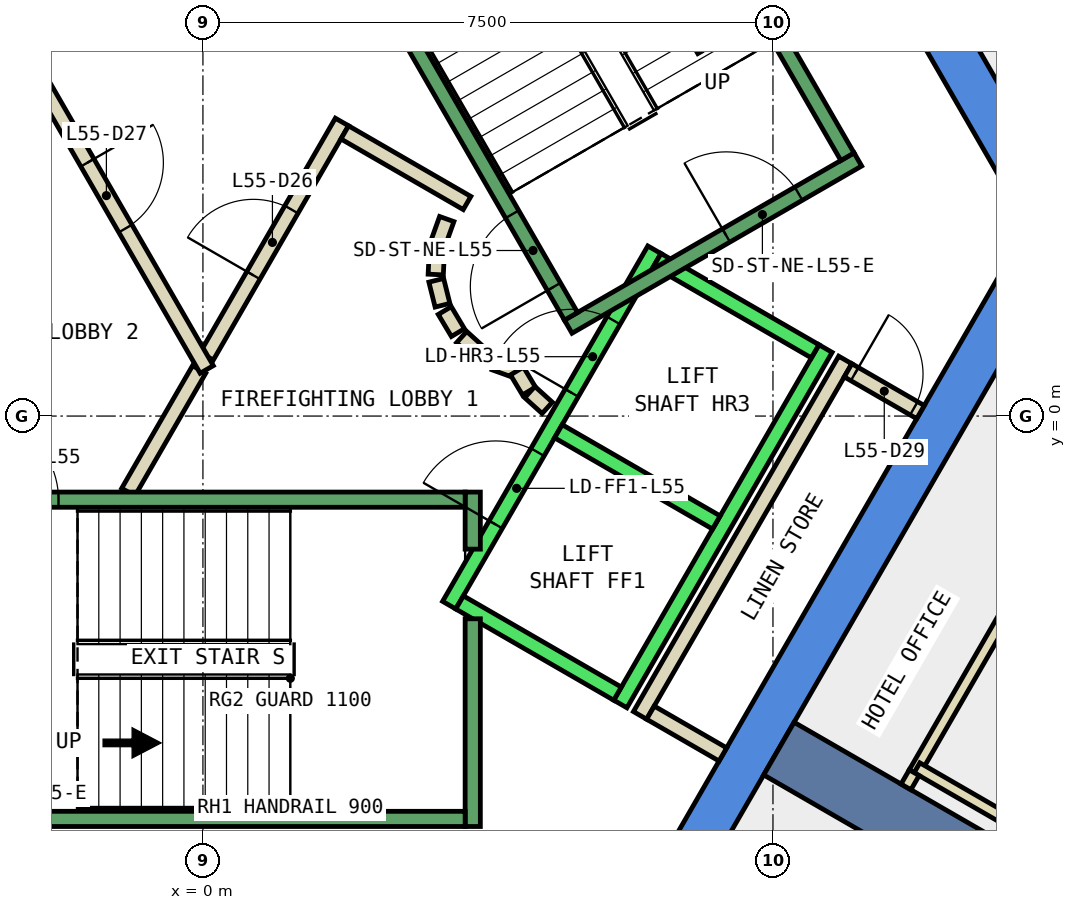
"""IFC4 building model, lengths in metres.
Left out: names, types, materials, properties, quantities, classifications, styles, units other than length and angle.
Written with IfcOpenShell. Run it as: python <this file> out.ifc"""

import sys

from ifc_helpers import new_model, si_unit, direction, frame, frame_2d, origin, place, context, subcontext, project, spatial, polyline, rectangle, outline, extrude, element, fill, save


model = new_model("IFC4")
c1 = context("Model", 3, precision=1e-05, world=origin(), true_north=direction((0.0, 1.0)))
c2 = subcontext(c1, "Body", "Model", "MODEL_VIEW")
j1 = project(units=[si_unit("LENGTHUNIT", "METRE"), si_unit("PLANEANGLEUNIT", "RADIAN")], contexts=[c1])
p1 = place(None, origin())
s1 = spatial("IfcSite", under=j1, at=p1, CompositionType="ELEMENT")
p2 = place(p1, origin())
s2 = spatial("IfcBuilding", under=s1, at=p2, CompositionType="ELEMENT")
p3 = place(p2, frame((0.0, 0.0, 245.0)))
s3 = spatial("IfcBuildingStorey", under=s2, at=p3, CompositionType="ELEMENT", Elevation=245.0)
p4 = place(p3, frame((0.0, 0.0, -0.34)))
e1 = element("IfcWall", 1, at=p4, inside=s3, PredefinedType="SHEAR", context=c2, shape_type="SweptSolid", body=[
    extrude(outline(polyline([(6.786, 10.747), (6.266, 10.447), (10.854, 2.5), (11.547, 2.5), (6.786, 10.747)])), origin(), (0.0, 0.0, 1.0), 3.6),
])
p5 = place(p3, frame((0.0, 0.0, -0.34)))
e2 = element("IfcWall", 2, at=p5, inside=s3, PredefinedType="SHEAR", context=c2, shape_type="SweptSolid", body=[
    extrude(outline(polyline([(5.774, -7.5), (11.547, 2.5), (10.854, 2.5), (5.427, -6.9), (5.774, -7.5)])), origin(), (0.0, 0.0, 1.0), 3.6),
])
p6 = place(p3, frame((7.578, -4.375, -0.34), z_axis=(0.0, 0.0, 1.0), x_axis=(0.866024315419, -0.5000018851, 0.0)))
e3 = element("IfcWall", 3, at=p6, inside=s3, PredefinedType="SHEAR", context=c2, shape_type="SweptSolid", body=[
    extrude(rectangle(XDim=9.0, YDim=0.8, at=frame_2d((4.5, 0.0))), origin(), (0.0, 0.0, 1.0), 3.6),
])
p7 = place(p3, frame((5.751, -3.938, 0.0), z_axis=(0.0, 0.0, 1.0), x_axis=(0.500034260056, 0.866005622828, 0.0)))
e4 = element("IfcWall", 4, at=p7, inside=s3, PredefinedType="PARTITIONING", context=c2, shape_type="SweptSolid", body=[
    extrude(rectangle(XDim=5.399, YDim=0.2, at=frame_2d((2.7, 0.0))), origin(), (0.0, 0.0, 1.0), 3.26),
])
p8 = place(p3, frame((8.488, 0.602, 0.0), z_axis=(0.0, 0.0, 1.0), x_axis=(0.866063652425, -0.499933745558, 0.0)))
e5 = element("IfcWall", 5, at=p8, inside=s3, PredefinedType="PARTITIONING", context=c2, shape_type="SweptSolid", body=[
    extrude(rectangle(XDim=1.1, YDim=0.2, at=frame_2d((0.55, 0.0))), origin(), (0.0, 0.0, 1.0), 3.26),
])
p9 = place(p8, frame((0.1, 0.0, 0.0)))
e6 = element("IfcOpeningElement", 6, at=p9, cuts=e5, PredefinedType="OPENING", context=c2, shape_type="SweptSolid", body=[
    extrude(rectangle(XDim=0.9, YDim=2.1, at=frame_2d((0.45, 1.05))), frame((0.0, 0.11, 0.0), z_axis=(0.0, -1.0, 0.0), x_axis=(1.0, 0.0, 0.0)), (0.0, 0.0, 1.0), 0.22),
])
p10 = place(p3, frame((6.841, -4.452, 0.0), z_axis=(0.0, 0.0, 1.0), x_axis=(-0.86621513555, 0.499671230855, 0.0)))
e7 = element("IfcWall", 7, at=p10, inside=s3, PredefinedType="PARTITIONING", context=c2, shape_type="SweptSolid", body=[
    extrude(rectangle(XDim=1.1, YDim=0.2, at=frame_2d((0.55, 0.0))), origin(), (0.0, 0.0, 1.0), 3.26),
])
p11 = place(p3, frame((9.358, -4.692, 0.0), z_axis=(0.0, 0.0, 1.0), x_axis=(0.500027777314, 0.866009365951, 0.0)))
e8 = element("IfcWall", 8, at=p11, inside=s3, PredefinedType="PARTITIONING", context=c2, shape_type="SweptSolid", body=[
    extrude(rectangle(XDim=7.36, YDim=0.15, at=frame_2d((3.68, 0.0))), origin(), (0.0, 0.0, 1.0), 3.26),
])
p12 = place(p3, frame((-0.982, -1.0, 0.0), z_axis=(0.0, 0.0, 1.0), x_axis=(0.50024047865, 0.865886518847, 0.0)))
e9 = element("IfcWall", 9, at=p12, inside=s3, PredefinedType="PARTITIONING", context=c2, shape_type="SweptSolid", body=[
    extrude(rectangle(XDim=1.863, YDim=0.2, at=frame_2d((0.931, 0.0))), origin(), (0.0, 0.0, 1.0), 3.26),
])
p13 = place(p3, frame((0.05, 0.787, 0.0), z_axis=(0.0, 0.0, 1.0), x_axis=(0.499954076797, 0.866051915934, 0.0)))
e10 = element("IfcWall", 10, at=p13, inside=s3, PredefinedType="PARTITIONING", context=c2, shape_type="SweptSolid", body=[
    extrude(rectangle(XDim=3.558, YDim=0.2, at=frame_2d((1.779, 0.0))), origin(), (0.0, 0.0, 1.0), 3.26),
])
p14 = place(p13, frame((1.229, 0.0, 0.0)))
e11 = element("IfcOpeningElement", 11, at=p14, cuts=e10, PredefinedType="OPENING", context=c2, shape_type="SweptSolid", body=[
    extrude(rectangle(XDim=1.0, YDim=2.1, at=frame_2d((0.5, 1.05))), frame((0.0, 0.11, 0.0), z_axis=(0.0, -1.0, 0.0), x_axis=(1.0, 0.0, 0.0)), (0.0, 0.0, 1.0), 0.22),
])
p15 = place(p3, frame((1.866, 3.732, 0.0), z_axis=(0.0, 0.0, 1.0), x_axis=(0.866043361281, -0.499968895414, 0.0)))
e12 = element("IfcWall", 12, at=p15, inside=s3, PredefinedType="PARTITIONING", context=c2, shape_type="SweptSolid", body=[
    extrude(rectangle(XDim=1.858, YDim=0.2, at=frame_2d((0.929, 0.0))), origin(), (0.0, 0.0, 1.0), 3.26),
])
p16 = place(p3, frame((3.208, 2.592, 0.0), z_axis=(0.0, 0.0, 1.0), x_axis=(-0.337388820924, -0.941365382578, 0.0)))
e13 = element("IfcWall", 13, at=p16, inside=s3, PredefinedType="PARTITIONING", context=c2, shape_type="SweptSolid", body=[
    extrude(rectangle(XDim=0.338, YDim=0.2, at=frame_2d((0.169, 0.0))), origin(), (0.0, 0.0, 1.0), 3.26),
])
p17 = place(p3, frame((3.079, 2.199, 0.0), z_axis=(0.0, 0.0, 1.0), x_axis=(-0.047771483479, -0.998858290933, 0.0)))
e14 = element("IfcWall", 14, at=p17, inside=s3, PredefinedType="PARTITIONING", context=c2, shape_type="SweptSolid", body=[
    extrude(rectangle(XDim=0.337, YDim=0.2, at=frame_2d((0.169, 0.0))), origin(), (0.0, 0.0, 1.0), 3.26),
])
p18 = place(p3, frame((3.07, 1.786, 0.0), z_axis=(0.0, 0.0, 1.0), x_axis=(0.242705583207, -0.970099994784, 0.0)))
e15 = element("IfcWall", 15, at=p18, inside=s3, PredefinedType="PARTITIONING", context=c2, shape_type="SweptSolid", body=[
    extrude(rectangle(XDim=0.338, YDim=0.2, at=frame_2d((0.169, 0.0))), origin(), (0.0, 0.0, 1.0), 3.26),
])
for number, where, z_axis, x_axis in (
    (16, (3.182, 1.388, 0.0), (0.0, 0.0, 1.0), (0.512, -0.859, 0.0)),
    (17, (3.404, 1.039, 0.0), (0.0, 0.0, 1.0), (0.74, -0.672, 0.0)),
):
    element("IfcWall", number, at=place(p3, frame(where, z_axis=z_axis, x_axis=x_axis)), inside=s3, PredefinedType="PARTITIONING", context=c2, shape_type="SweptSolid", body=[
        extrude(rectangle(XDim=0.338, YDim=0.2, at=frame_2d((0.169, 0.0))), origin(), (0.0, 0.0, 1.0), 3.26),
    ])
p19 = place(p3, frame((3.838, 0.702, 0.0), z_axis=(0.0, 0.0, 1.0), x_axis=(0.941035081519, -0.338308993895, 0.0)))
e18 = element("IfcWall", 18, at=p19, inside=s3, PredefinedType="PARTITIONING", context=c2, shape_type="SweptSolid", body=[
    extrude(rectangle(XDim=0.337, YDim=0.2, at=frame_2d((0.168, 0.0))), origin(), (0.0, 0.0, 1.0), 3.26),
])
p20 = place(p3, frame((4.132, 0.593, 0.0), z_axis=(0.0, 0.0, 1.0), x_axis=(0.513561617048, -0.858052717201, 0.0)))
e19 = element("IfcWall", 19, at=p20, inside=s3, PredefinedType="PARTITIONING", context=c2, shape_type="SweptSolid", body=[
    extrude(rectangle(XDim=0.308, YDim=0.2, at=frame_2d((0.154, 0.0))), origin(), (0.0, 0.0, 1.0), 3.26),
])
p21 = place(p3, frame((4.301, 0.315, 0.0), z_axis=(0.0, 0.0, 1.0), x_axis=(0.741798017506, -0.670623367639, 0.0)))
e20 = element("IfcWall", 20, at=p21, inside=s3, PredefinedType="PARTITIONING", context=c2, shape_type="SweptSolid", body=[
    extrude(rectangle(XDim=0.309, YDim=0.2, at=frame_2d((0.154, 0.0))), origin(), (0.0, 0.0, 1.0), 3.26),
])
p22 = place(p3, frame((-2.54, 5.1, 0.0), z_axis=(0.0, 0.0, 1.0), x_axis=(0.499925051871, -0.866068670783, 0.0)))
e21 = element("IfcWall", 21, at=p22, inside=s3, PredefinedType="PARTITIONING", context=c2, shape_type="SweptSolid", body=[
    extrude(rectangle(XDim=5.181, YDim=0.2, at=frame_2d((2.59, 0.0))), origin(), (0.0, 0.0, 1.0), 3.26),
])
p23 = place(p22, frame((2.04, 0.0, 0.0)))
e22 = element("IfcOpeningElement", 22, at=p23, cuts=e21, PredefinedType="OPENING", context=c2, shape_type="SweptSolid", body=[
    extrude(rectangle(XDim=1.0, YDim=2.1, at=frame_2d((0.5, 1.05))), frame((0.0, 0.11, 0.0), z_axis=(0.0, -1.0, 0.0), x_axis=(1.0, 0.0, 0.0)), (0.0, 0.0, 1.0), 0.22),
])
p24 = place(p3, frame((9.395, -4.627, 0.0), z_axis=(0.0, 0.0, 1.0), x_axis=(0.866034131428, -0.499984882974, 0.0)))
e23 = element("IfcWall", 23, at=p24, inside=s3, PredefinedType="PARTITIONING", context=c2, shape_type="SweptSolid", body=[
    extrude(rectangle(XDim=5.1, YDim=0.15, at=frame_2d((2.55, 0.0))), origin(), (0.0, 0.0, 1.0), 3.26),
])
p25 = place(p3, frame((9.25, -4.879, 0.0), z_axis=(0.0, 0.0, 1.0), x_axis=(0.499787711288, 0.866147934042, 0.0)))
e24 = element("IfcWall", 24, at=p25, inside=s3, PredefinedType="PARTITIONING", context=c2, shape_type="SweptSolid", body=[
    extrude(rectangle(XDim=0.216, YDim=0.15, at=frame_2d((0.108, 0.0))), origin(), (0.0, 0.0, 1.0), 3.26),
])
p26 = place(p3, frame((3.24, -2.488, 0.0), z_axis=(0.0, 0.0, 1.0), x_axis=(0.500034260056, 0.866005622828, 0.0)))
e25 = element("IfcWall", 25, at=p26, inside=s3, PredefinedType="STANDARD", context=c2, shape_type="SweptSolid", body=[
    extrude(rectangle(XDim=5.399, YDim=0.2, at=frame_2d((2.7, 0.0))), origin(), (0.0, 0.0, 1.0), 3.26),
])
p27 = place(p26, frame((3.225, 0.0, 0.0)))
e26 = element("IfcOpeningElement", 26, at=p27, cuts=e25, PredefinedType="OPENING", context=c2, shape_type="SweptSolid", body=[
    extrude(rectangle(XDim=1.1, YDim=2.1, at=frame_2d((0.55, 1.05))), frame((0.0, 0.11, 0.0), z_axis=(0.0, -1.0, 0.0), x_axis=(1.0, 0.0, 0.0)), (0.0, 0.0, 1.0), 0.22),
])
p28 = place(p26, frame((1.225, 0.0, 0.0)))
e27 = element("IfcOpeningElement", 27, at=p28, cuts=e25, PredefinedType="OPENING", context=c2, shape_type="SweptSolid", body=[
    extrude(rectangle(XDim=1.1, YDim=2.1, at=frame_2d((0.55, 1.05))), frame((0.0, 0.11, 0.0), z_axis=(0.0, -1.0, 0.0), x_axis=(1.0, 0.0, 0.0)), (0.0, 0.0, 1.0), 0.22),
])
p29 = place(p3, frame((5.492, -3.788, 0.0), z_axis=(0.0, 0.0, 1.0), x_axis=(0.500034260056, 0.866005622828, 0.0)))
e28 = element("IfcWall", 28, at=p29, inside=s3, PredefinedType="STANDARD", context=c2, shape_type="SweptSolid", body=[
    extrude(rectangle(XDim=5.399, YDim=0.2, at=frame_2d((2.7, 0.0))), origin(), (0.0, 0.0, 1.0), 3.26),
])
p30 = place(p3, frame((3.377, -2.452, 0.0), z_axis=(0.0, 0.0, 1.0), x_axis=(0.865955154139, -0.50012165622, 0.0)))
e29 = element("IfcWall", 29, at=p30, inside=s3, PredefinedType="STANDARD", context=c2, shape_type="SweptSolid", body=[
    extrude(rectangle(XDim=2.4, YDim=0.2, at=frame_2d((1.2, 0.0))), origin(), (0.0, 0.0, 1.0), 3.26),
])
for number, where, z_axis, x_axis in (
    (30, (4.677, -0.2, 0.0), (0.0, 0.0, 1.0), (0.866, -0.5, 0.0)),
    (31, (5.977, 2.052, 0.0), (0.0, 0.0, 1.0), (0.866, -0.5, 0.0)),
):
    element("IfcWall", number, at=place(p3, frame(where, z_axis=z_axis, x_axis=x_axis)), inside=s3, PredefinedType="STANDARD", context=c2, shape_type="SweptSolid", body=[
        extrude(rectangle(XDim=2.399, YDim=0.2, at=frame_2d((1.2, 0.0))), origin(), (0.0, 0.0, 1.0), 3.26),
    ])
p31 = place(p3, frame((3.55, -2.667, 0.0), z_axis=(0.0, 0.0, 1.0), x_axis=(0.0, -1.0, 0.0)))
e32 = element("IfcWall", 32, at=p31, inside=s3, PredefinedType="STANDARD", context=c2, shape_type="SweptSolid", body=[
    extrude(rectangle(XDim=2.733, YDim=0.2, at=frame_2d((1.366, 0.0))), origin(), (0.0, 0.0, 1.0), 3.26),
])
p32 = place(p3, frame((3.55, -1.0, 0.0), z_axis=(0.0, 0.0, 1.0), x_axis=(0.0, -1.0, 0.0)))
e33 = element("IfcWall", 33, at=p32, inside=s3, PredefinedType="STANDARD", context=c2, shape_type="SweptSolid", body=[
    extrude(rectangle(XDim=0.751, YDim=0.2, at=frame_2d((0.375, 0.0))), origin(), (0.0, 0.0, 1.0), 3.26),
])
p33 = place(p3, frame((-3.45, -1.1, 0.0), z_axis=(0.0, 0.0, 1.0), x_axis=(1.0, 0.0, 0.0)))
e34 = element("IfcWall", 34, at=p33, inside=s3, PredefinedType="STANDARD", context=c2, shape_type="SweptSolid", body=[
    extrude(rectangle(XDim=6.9, YDim=0.2, at=frame_2d((3.45, 0.0))), origin(), (0.0, 0.0, 1.0), 3.26),
])
p34 = place(p33, frame((0.45, 0.0, 0.0)))
e35 = element("IfcOpeningElement", 35, at=p34, cuts=e34, PredefinedType="OPENING", context=c2, shape_type="SweptSolid", body=[
    extrude(rectangle(XDim=1.1, YDim=2.2, at=frame_2d((0.55, 1.1))), frame((0.0, 0.11, 0.0), z_axis=(0.0, -1.0, 0.0), x_axis=(1.0, 0.0, 0.0)), (0.0, 0.0, 1.0), 0.22),
])
p35 = place(p3, frame((-3.45, -5.3, 0.0), z_axis=(0.0, 0.0, 1.0), x_axis=(1.0, 0.0, 0.0)))
e36 = element("IfcWall", 36, at=p35, inside=s3, PredefinedType="STANDARD", context=c2, shape_type="SweptSolid", body=[
    extrude(rectangle(XDim=6.9, YDim=0.2, at=frame_2d((3.45, 0.0))), origin(), (0.0, 0.0, 1.0), 3.26),
])
p36 = place(p3, frame((4.806, 1.176, 0.0), z_axis=(0.0, 0.0, 1.0), x_axis=(0.866059941101, 0.499940174841, 0.0)))
e37 = element("IfcWall", 37, at=p36, inside=s3, PredefinedType="STANDARD", context=c2, shape_type="SweptSolid", body=[
    extrude(rectangle(XDim=4.4, YDim=0.2, at=frame_2d((2.2, 0.0))), origin(), (0.0, 0.0, 1.0), 3.26),
])
p37 = place(p36, frame((2.4, 0.0, 0.0)))
e38 = element("IfcOpeningElement", 38, at=p37, cuts=e37, PredefinedType="OPENING", context=c2, shape_type="SweptSolid", body=[
    extrude(rectangle(XDim=1.1, YDim=2.2, at=frame_2d((0.55, 1.1))), frame((0.0, 0.11, 0.0), z_axis=(0.0, -1.0, 0.0), x_axis=(1.0, 0.0, 0.0)), (0.0, 0.0, 1.0), 0.22),
])
p38 = place(p3, frame((4.843, 1.312, 0.0), z_axis=(0.0, 0.0, 1.0), x_axis=(-0.499963383562, 0.866046543262, 0.0)))
e39 = element("IfcWall", 39, at=p38, inside=s3, PredefinedType="STANDARD", context=c2, shape_type="SweptSolid", body=[
    extrude(rectangle(XDim=6.9, YDim=0.2, at=frame_2d((3.45, 0.0))), origin(), (0.0, 0.0, 1.0), 3.26),
])
p39 = place(p38, frame((0.45, 0.0, 0.0)))
e40 = element("IfcOpeningElement", 40, at=p39, cuts=e39, PredefinedType="OPENING", context=c2, shape_type="SweptSolid", body=[
    extrude(rectangle(XDim=1.1, YDim=2.2, at=frame_2d((0.55, 1.1))), frame((0.0, 0.11, 0.0), z_axis=(0.0, -1.0, 0.0), x_axis=(1.0, 0.0, 0.0)), (0.0, 0.0, 1.0), 0.22),
])
p40 = place(p3, frame((8.48, 3.412, 0.0), z_axis=(0.0, 0.0, 1.0), x_axis=(-0.499978703459, 0.866037698999, 0.0)))
e41 = element("IfcWall", 41, at=p40, inside=s3, PredefinedType="STANDARD", context=c2, shape_type="SweptSolid", body=[
    extrude(rectangle(XDim=6.9, YDim=0.2, at=frame_2d((3.45, 0.0))), origin(), (0.0, 0.0, 1.0), 3.26),
])
p41 = place(p3, frame((-1.393, 7.288, 0.0), z_axis=(0.0, 0.0, 1.0), x_axis=(-0.499963383562, -0.866046543262, 0.0)))
e42 = element("IfcWall", 42, at=p41, inside=s3, PredefinedType="STANDARD", context=c2, shape_type="SweptSolid", body=[
    extrude(rectangle(XDim=6.9, YDim=0.2, at=frame_2d((3.45, 0.0))), origin(), (0.0, 0.0, 1.0), 3.26),
])
p42 = place(p41, frame((0.45, 0.0, 0.0)))
e43 = element("IfcOpeningElement", 43, at=p42, cuts=e42, PredefinedType="OPENING", context=c2, shape_type="SweptSolid", body=[
    extrude(rectangle(XDim=1.1, YDim=2.2, at=frame_2d((0.55, 1.1))), frame((0.0, 0.11, 0.0), z_axis=(0.0, -1.0, 0.0), x_axis=(1.0, 0.0, 0.0)), (0.0, 0.0, 1.0), 0.22),
])
p43 = place(p14, origin())
e44 = element("IfcDoor", 44, at=p43, inside=s3, OperationType="SINGLE_SWING_RIGHT", PredefinedType="DOOR", context=c2, shape_type="SweptSolid", body=[
    extrude(rectangle(XDim=1.0, YDim=2.1, at=frame_2d((0.5, 1.05))), frame((0.0, 0.025, 0.0), z_axis=(0.0, -1.0, 0.0), x_axis=(1.0, 0.0, 0.0)), (0.0, 0.0, 1.0), 0.05),
])
fill(e11, e44)
p44 = place(p23, origin())
e45 = element("IfcDoor", 45, at=p44, inside=s3, OperationType="SINGLE_SWING_RIGHT", PredefinedType="DOOR", context=c2, shape_type="SweptSolid", body=[
    extrude(rectangle(XDim=1.0, YDim=2.1, at=frame_2d((0.5, 1.05))), frame((0.0, 0.025, 0.0), z_axis=(0.0, -1.0, 0.0), x_axis=(1.0, 0.0, 0.0)), (0.0, 0.0, 1.0), 0.05),
])
fill(e22, e45)
p45 = place(p9, origin())
e46 = element("IfcDoor", 46, at=p45, inside=s3, OperationType="SINGLE_SWING_RIGHT", PredefinedType="DOOR", context=c2, shape_type="SweptSolid", body=[
    extrude(rectangle(XDim=0.9, YDim=2.1, at=frame_2d((0.45, 1.05))), frame((0.0, 0.025, 0.0), z_axis=(0.0, -1.0, 0.0), x_axis=(1.0, 0.0, 0.0)), (0.0, 0.0, 1.0), 0.05),
])
fill(e6, e46)
p46 = place(p27, origin())
e47 = element("IfcDoor", 47, at=p46, inside=s3, OperationType="SLIDING_TO_LEFT", PredefinedType="DOOR", context=c2, shape_type="SweptSolid", body=[
    extrude(rectangle(XDim=1.1, YDim=2.1, at=frame_2d((0.55, 1.05))), frame((0.0, 0.025, 0.0), z_axis=(0.0, -1.0, 0.0), x_axis=(1.0, 0.0, 0.0)), (0.0, 0.0, 1.0), 0.05),
])
fill(e26, e47)
p47 = place(p28, origin())
e48 = element("IfcDoor", 48, at=p47, inside=s3, OperationType="SLIDING_TO_LEFT", PredefinedType="DOOR", context=c2, shape_type="SweptSolid", body=[
    extrude(rectangle(XDim=1.1, YDim=2.1, at=frame_2d((0.55, 1.05))), frame((0.0, 0.025, 0.0), z_axis=(0.0, -1.0, 0.0), x_axis=(1.0, 0.0, 0.0)), (0.0, 0.0, 1.0), 0.05),
])
fill(e27, e48)
p48 = place(p34, origin())
e49 = element("IfcDoor", 49, at=p48, inside=s3, OperationType="SINGLE_SWING_LEFT", PredefinedType="DOOR", context=c2, shape_type="SweptSolid", body=[
    extrude(rectangle(XDim=1.1, YDim=2.2, at=frame_2d((0.55, 1.1))), frame((0.0, 0.025, 0.0), z_axis=(0.0, -1.0, 0.0), x_axis=(1.0, 0.0, 0.0)), (0.0, 0.0, 1.0), 0.05),
])
fill(e35, e49)
p49 = place(p39, origin())
e50 = element("IfcDoor", 50, at=p49, inside=s3, OperationType="SINGLE_SWING_LEFT", PredefinedType="DOOR", context=c2, shape_type="SweptSolid", body=[
    extrude(rectangle(XDim=1.1, YDim=2.2, at=frame_2d((0.55, 1.1))), frame((0.0, 0.025, 0.0), z_axis=(0.0, -1.0, 0.0), x_axis=(1.0, 0.0, 0.0)), (0.0, 0.0, 1.0), 0.05),
])
fill(e40, e50)
p50 = place(p37, origin())
e51 = element("IfcDoor", 51, at=p50, inside=s3, OperationType="SINGLE_SWING_LEFT", PredefinedType="DOOR", context=c2, shape_type="SweptSolid", body=[
    extrude(rectangle(XDim=1.1, YDim=2.2, at=frame_2d((0.55, 1.1))), frame((0.0, 0.025, 0.0), z_axis=(0.0, -1.0, 0.0), x_axis=(1.0, 0.0, 0.0)), (0.0, 0.0, 1.0), 0.05),
])
fill(e38, e51)
save(model, sys.argv[1])
